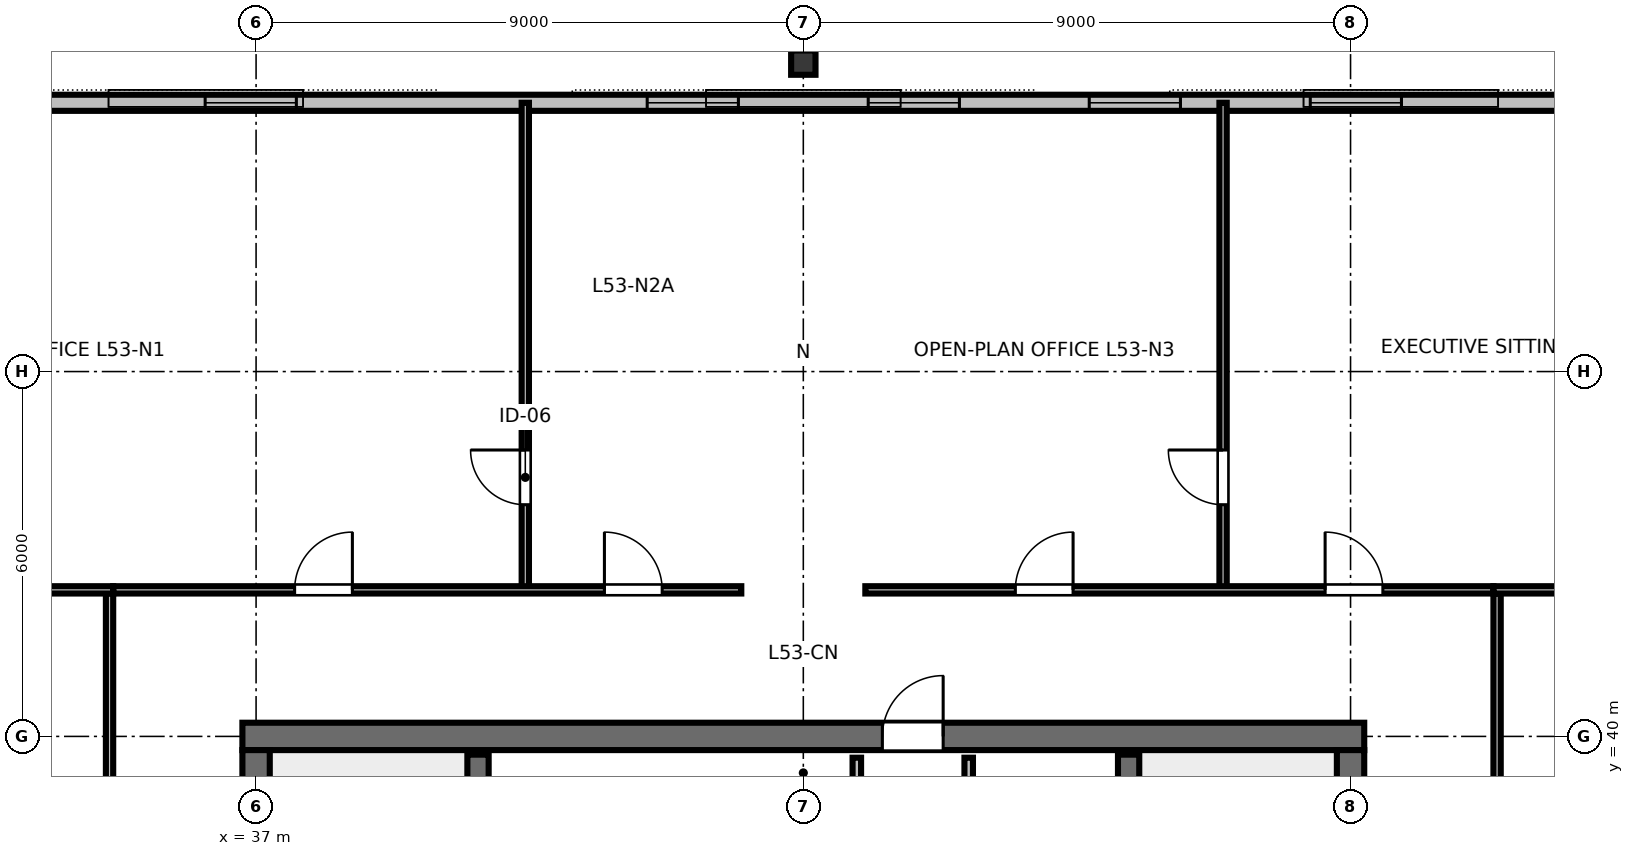
"""IFC4 building model, lengths in metres.
Left out: names, types, materials, properties, quantities, classifications, styles, units other than length and angle.
Written with IfcOpenShell. Run it as: python <this file> out.ifc"""

import sys

from ifc_helpers import new_model, si_unit, direction, frame, frame_2d, origin, origin_2d, place, context, subcontext, project, spatial, rectangle, i_section, extrude, element, fill, save


model = new_model("IFC4")
c1 = context("Model", 3, precision=1e-05, world=origin(), true_north=direction((0.0, 1.0)))
c2 = subcontext(c1, "Body", "Model", "MODEL_VIEW")
j1 = project(units=[si_unit("LENGTHUNIT", "METRE"), si_unit("PLANEANGLEUNIT", "RADIAN")], contexts=[c1])
p1 = place(None, origin())
s1 = spatial("IfcSite", under=j1, at=p1, CompositionType="ELEMENT")
p2 = place(p1, origin())
s2 = spatial("IfcBuilding", under=s1, at=p2, CompositionType="ELEMENT")
p3 = place(p2, frame((0.0, 0.0, 202.2)))
s3 = spatial("IfcBuildingStorey", under=s2, at=p3, CompositionType="ELEMENT", Elevation=202.2)
p4 = place(p3, frame((36.775, 40.0, 0.0), z_axis=(0.0, 0.0, 1.0), x_axis=(1.0, 0.0, 0.0)))
e1 = element("IfcWall", 1, at=p4, inside=s3, PredefinedType="SHEAR", context=c2, shape_type="SweptSolid", body=[
    extrude(rectangle(XDim=18.45, YDim=0.45, at=frame_2d((9.225, 0.0))), origin(), (0.0, 0.0, 1.0), 3.36),
])
p5 = place(p4, frame((10.525, 0.0, 0.0)))
e2 = element("IfcOpeningElement", 2, at=p5, cuts=e1, PredefinedType="OPENING", context=c2, shape_type="SweptSolid", body=[
    extrude(rectangle(XDim=1.0, YDim=2.15, at=frame_2d((0.5, 1.075))), frame((0.0, 0.235, 0.0), z_axis=(0.0, -1.0, 0.0), x_axis=(1.0, 0.0, 0.0)), (0.0, 0.0, 1.0), 0.47),
])
p6 = place(p3, frame((37.0, 24.225, 0.0), z_axis=(0.0, 0.0, 1.0), x_axis=(0.0, 1.0, 0.0)))
e3 = element("IfcWall", 3, at=p6, inside=s3, PredefinedType="SHEAR", context=c2, shape_type="SweptSolid", body=[
    extrude(rectangle(XDim=15.55, YDim=0.45, at=frame_2d((7.775, 0.0))), origin(), (0.0, 0.0, 1.0), 3.36),
])
p7 = place(p6, frame((5.3, 0.0, 0.0)))
e4 = element("IfcOpeningElement", 4, at=p7, cuts=e3, PredefinedType="OPENING", context=c2, shape_type="SweptSolid", body=[
    extrude(rectangle(XDim=1.15, YDim=2.15, at=frame_2d((0.575, 1.075))), frame((0.0, 0.235, 0.0), z_axis=(0.0, -1.0, 0.0), x_axis=(1.0, 0.0, 0.0)), (0.0, 0.0, 1.0), 0.47),
])
p8 = place(p3, frame((55.0, 24.225, 0.0), z_axis=(0.0, 0.0, 1.0), x_axis=(0.0, 1.0, 0.0)))
e5 = element("IfcWall", 5, at=p8, inside=s3, PredefinedType="SHEAR", context=c2, shape_type="SweptSolid", body=[
    extrude(rectangle(XDim=15.55, YDim=0.45, at=frame_2d((7.775, 0.0))), origin(), (0.0, 0.0, 1.0), 3.36),
])
p9 = place(p8, frame((5.3, 0.0, 0.0)))
e6 = element("IfcOpeningElement", 6, at=p9, cuts=e5, PredefinedType="OPENING", context=c2, shape_type="SweptSolid", body=[
    extrude(rectangle(XDim=1.15, YDim=2.15, at=frame_2d((0.575, 1.075))), frame((0.0, 0.235, 0.0), z_axis=(0.0, -1.0, 0.0), x_axis=(1.0, 0.0, 0.0)), (0.0, 0.0, 1.0), 0.47),
])
p10 = place(p3, frame((46.0, 51.08, 0.0), z_axis=(0.0, 0.0, 1.0), x_axis=(1.0, 0.0, 0.0)))
e7 = element("IfcColumn", 7, at=p10, inside=s3, PredefinedType="COLUMN", context=c2, shape_type="SweptSolid", body=[
    extrude(i_section(OverallWidth=0.401, OverallDepth=0.399, WebThickness=0.025, FlangeThickness=0.04, FilletRadius=0.025, at=origin_2d()), origin(), (0.0, 0.0, 1.0), 3.373),
])
p11 = place(p3, frame((61.64, 50.42, 0.0), z_axis=(0.0, 0.0, 1.0), x_axis=(-1.0, 0.0, 0.0)))
e8 = element("IfcWall", 8, at=p11, inside=s3, PredefinedType="STANDARD", context=c2, shape_type="SweptSolid", body=[
    extrude(rectangle(XDim=31.28, YDim=0.265, at=frame_2d((15.64, 0.0))), origin(), (0.0, 0.0, 1.0), 3.375),
])
p12 = place(p11, frame((5.802, 0.0, 0.85)))
e9 = element("IfcOpeningElement", 9, at=p12, cuts=e8, PredefinedType="OPENING", context=c2, shape_type="SweptSolid", body=[
    extrude(rectangle(XDim=1.5, YDim=1.85, at=frame_2d((0.75, 0.925))), frame((0.0, 0.142, 0.0), z_axis=(0.0, -1.0, 0.0), x_axis=(1.0, 0.0, 0.0)), (0.0, 0.0, 1.0), 0.285),
])
p13 = place(p11, frame((9.438, 0.0, 0.85)))
e10 = element("IfcOpeningElement", 10, at=p13, cuts=e8, PredefinedType="OPENING", context=c2, shape_type="SweptSolid", body=[
    extrude(rectangle(XDim=1.5, YDim=1.85, at=frame_2d((0.75, 0.925))), frame((0.0, 0.142, 0.0), z_axis=(0.0, -1.0, 0.0), x_axis=(1.0, 0.0, 0.0)), (0.0, 0.0, 1.0), 0.285),
])
p14 = place(p11, frame((13.073, 0.0, 0.85)))
e11 = element("IfcOpeningElement", 11, at=p14, cuts=e8, PredefinedType="OPENING", context=c2, shape_type="SweptSolid", body=[
    extrude(rectangle(XDim=1.5, YDim=1.85, at=frame_2d((0.75, 0.925))), frame((0.0, 0.142, 0.0), z_axis=(0.0, -1.0, 0.0), x_axis=(1.0, 0.0, 0.0)), (0.0, 0.0, 1.0), 0.285),
])
p15 = place(p11, frame((16.708, 0.0, 0.85)))
e12 = element("IfcOpeningElement", 12, at=p15, cuts=e8, PredefinedType="OPENING", context=c2, shape_type="SweptSolid", body=[
    extrude(rectangle(XDim=1.5, YDim=1.85, at=frame_2d((0.75, 0.925))), frame((0.0, 0.142, 0.0), z_axis=(0.0, -1.0, 0.0), x_axis=(1.0, 0.0, 0.0)), (0.0, 0.0, 1.0), 0.285),
])
p16 = place(p11, frame((23.978, 0.0, 0.85)))
e13 = element("IfcOpeningElement", 13, at=p16, cuts=e8, PredefinedType="OPENING", context=c2, shape_type="SweptSolid", body=[
    extrude(rectangle(XDim=1.5, YDim=1.85, at=frame_2d((0.75, 0.925))), frame((0.0, 0.142, 0.0), z_axis=(0.0, -1.0, 0.0), x_axis=(1.0, 0.0, 0.0)), (0.0, 0.0, 1.0), 0.285),
])
for number, where, z_axis, x_axis in (
    (14, (40.65, 32.0, 0.0), (0.0, 0.0, 1.0), (0.0, 1.0, 0.0)),
    (15, (51.35, 32.0, 0.0), (0.0, 0.0, 1.0), (0.0, 1.0, 0.0)),
):
    element("IfcWall", number, at=place(p3, frame(where, z_axis=z_axis, x_axis=x_axis)), inside=s3, PredefinedType="SHEAR", context=c2, shape_type="SweptSolid", body=[
        extrude(rectangle(XDim=7.7, YDim=0.35, at=frame_2d((3.85, 0.0))), origin(), (0.0, 0.0, 1.0), 3.6),
    ])
p17 = place(p3, frame((46.88, 32.05, 0.0), z_axis=(0.0, 0.0, 1.0), x_axis=(0.0, 1.0, 0.0)))
e16 = element("IfcWall", 16, at=p17, inside=s3, PredefinedType="PARTITIONING", context=c2, shape_type="SweptSolid", body=[
    extrude(rectangle(XDim=7.6, YDim=0.14, at=frame_2d((3.8, 0.0))), origin(), (0.0, 0.0, 1.0), 3.375),
])
p18 = place(p17, frame((3.4, 0.0, 0.0)))
e17 = element("IfcOpeningElement", 17, at=p18, cuts=e16, PredefinedType="OPENING", context=c2, shape_type="SweptSolid", body=[
    extrude(rectangle(XDim=0.95, YDim=2.15, at=frame_2d((0.475, 1.075))), frame((0.0, 0.08, 0.0), z_axis=(0.0, -1.0, 0.0), x_axis=(1.0, 0.0, 0.0)), (0.0, 0.0, 1.0), 0.16),
])
p19 = place(p3, frame((48.72, 32.05, 0.0), z_axis=(0.0, 0.0, 1.0), x_axis=(0.0, 1.0, 0.0)))
e18 = element("IfcWall", 18, at=p19, inside=s3, PredefinedType="PARTITIONING", context=c2, shape_type="SweptSolid", body=[
    extrude(rectangle(XDim=7.6, YDim=0.14, at=frame_2d((3.8, 0.0))), origin(), (0.0, 0.0, 1.0), 3.375),
])
p20 = place(p19, frame((0.8, 0.0, 0.0)))
e19 = element("IfcOpeningElement", 19, at=p20, cuts=e18, PredefinedType="OPENING", context=c2, shape_type="SweptSolid", body=[
    extrude(rectangle(XDim=0.9, YDim=2.15, at=frame_2d((0.45, 1.075))), frame((0.0, 0.08, 0.0), z_axis=(0.0, -1.0, 0.0), x_axis=(1.0, 0.0, 0.0)), (0.0, 0.0, 1.0), 0.16),
])
p21 = place(p19, frame((3.35, 0.0, 0.0)))
e20 = element("IfcOpeningElement", 20, at=p21, cuts=e18, PredefinedType="OPENING", context=c2, shape_type="SweptSolid", body=[
    extrude(rectangle(XDim=0.9, YDim=2.15, at=frame_2d((0.45, 1.075))), frame((0.0, 0.08, 0.0), z_axis=(0.0, -1.0, 0.0), x_axis=(1.0, 0.0, 0.0)), (0.0, 0.0, 1.0), 0.16),
])
p22 = place(p19, frame((5.9, 0.0, 0.0)))
e21 = element("IfcOpeningElement", 21, at=p22, cuts=e18, PredefinedType="OPENING", context=c2, shape_type="SweptSolid", body=[
    extrude(rectangle(XDim=0.92, YDim=2.15, at=frame_2d((0.46, 1.075))), frame((0.0, 0.08, 0.0), z_axis=(0.0, -1.0, 0.0), x_axis=(1.0, 0.0, 0.0)), (0.0, 0.0, 1.0), 0.16),
])
p23 = place(p3, frame((41.428, 42.41, 0.0), z_axis=(0.0, 0.0, 1.0), x_axis=(0.0, 1.0, 0.0)))
e22 = element("IfcWall", 22, at=p23, inside=s3, PredefinedType="PARTITIONING", context=c2, shape_type="SweptSolid", body=[
    extrude(rectangle(XDim=8.01, YDim=0.12, at=frame_2d((4.005, 0.0))), origin(), (0.0, 0.0, 1.0), 2.655),
])
p24 = place(p23, frame((1.4, 0.0, 0.0)))
e23 = element("IfcOpeningElement", 23, at=p24, cuts=e22, PredefinedType="OPENING", context=c2, shape_type="SweptSolid", body=[
    extrude(rectangle(XDim=0.9, YDim=2.15, at=frame_2d((0.45, 1.075))), frame((0.0, 0.07, 0.0), z_axis=(0.0, -1.0, 0.0), x_axis=(1.0, 0.0, 0.0)), (0.0, 0.0, 1.0), 0.14),
])
p25 = place(p3, frame((52.903, 42.41, 0.0), z_axis=(0.0, 0.0, 1.0), x_axis=(0.0, 1.0, 0.0)))
e24 = element("IfcWall", 24, at=p25, inside=s3, PredefinedType="PARTITIONING", context=c2, shape_type="SweptSolid", body=[
    extrude(rectangle(XDim=8.01, YDim=0.12, at=frame_2d((4.005, 0.0))), origin(), (0.0, 0.0, 1.0), 2.655),
])
p26 = place(p25, frame((1.4, 0.0, 0.0)))
e25 = element("IfcOpeningElement", 25, at=p26, cuts=e24, PredefinedType="OPENING", context=c2, shape_type="SweptSolid", body=[
    extrude(rectangle(XDim=0.9, YDim=2.15, at=frame_2d((0.45, 1.075))), frame((0.0, 0.07, 0.0), z_axis=(0.0, -1.0, 0.0), x_axis=(1.0, 0.0, 0.0)), (0.0, 0.0, 1.0), 0.14),
])
p27 = place(p3, frame((34.65, 42.41, 0.0), z_axis=(0.0, 0.0, 1.0), x_axis=(1.0, 0.0, 0.0)))
e26 = element("IfcWall", 26, at=p27, inside=s3, PredefinedType="PARTITIONING", context=c2, shape_type="SweptSolid", body=[
    extrude(rectangle(XDim=10.33, YDim=0.12, at=frame_2d((5.165, 0.0))), origin(), (0.0, 0.0, 1.0), 2.655),
])
p28 = place(p27, frame((2.984, 0.0, 0.0)))
e27 = element("IfcOpeningElement", 27, at=p28, cuts=e26, PredefinedType="OPENING", context=c2, shape_type="SweptSolid", body=[
    extrude(rectangle(XDim=0.95, YDim=2.15, at=frame_2d((0.475, 1.075))), frame((0.0, 0.07, 0.0), z_axis=(0.0, -1.0, 0.0), x_axis=(1.0, 0.0, 0.0)), (0.0, 0.0, 1.0), 0.14),
])
p29 = place(p27, frame((8.079, 0.0, 0.0)))
e28 = element("IfcOpeningElement", 28, at=p29, cuts=e26, PredefinedType="OPENING", context=c2, shape_type="SweptSolid", body=[
    extrude(rectangle(XDim=0.95, YDim=2.15, at=frame_2d((0.475, 1.075))), frame((0.0, 0.07, 0.0), z_axis=(0.0, -1.0, 0.0), x_axis=(1.0, 0.0, 0.0)), (0.0, 0.0, 1.0), 0.14),
])
p30 = place(p3, frame((47.02, 42.41, 0.0), z_axis=(0.0, 0.0, 1.0), x_axis=(1.0, 0.0, 0.0)))
e29 = element("IfcWall", 29, at=p30, inside=s3, PredefinedType="PARTITIONING", context=c2, shape_type="SweptSolid", body=[
    extrude(rectangle(XDim=10.33, YDim=0.12, at=frame_2d((5.165, 0.0))), origin(), (0.0, 0.0, 1.0), 2.655),
])
p31 = place(p30, frame((2.467, 0.0, 0.0)))
e30 = element("IfcOpeningElement", 30, at=p31, cuts=e29, PredefinedType="OPENING", context=c2, shape_type="SweptSolid", body=[
    extrude(rectangle(XDim=0.95, YDim=2.15, at=frame_2d((0.475, 1.075))), frame((0.0, 0.07, 0.0), z_axis=(0.0, -1.0, 0.0), x_axis=(1.0, 0.0, 0.0)), (0.0, 0.0, 1.0), 0.14),
])
p32 = place(p30, frame((7.562, 0.0, 0.0)))
e31 = element("IfcOpeningElement", 31, at=p32, cuts=e29, PredefinedType="OPENING", context=c2, shape_type="SweptSolid", body=[
    extrude(rectangle(XDim=0.95, YDim=2.15, at=frame_2d((0.475, 1.075))), frame((0.0, 0.07, 0.0), z_axis=(0.0, -1.0, 0.0), x_axis=(1.0, 0.0, 0.0)), (0.0, 0.0, 1.0), 0.14),
])
p33 = place(p3, frame((34.59, 21.65, 0.0), z_axis=(0.0, 0.0, 1.0), x_axis=(0.0, 1.0, 0.0)))
e32 = element("IfcWall", 32, at=p33, inside=s3, PredefinedType="PARTITIONING", context=c2, shape_type="SweptSolid", body=[
    extrude(rectangle(XDim=20.7, YDim=0.12, at=frame_2d((10.35, 0.0))), origin(), (0.0, 0.0, 1.0), 2.655),
])
p34 = place(p33, frame((2.698, 0.0, 0.0)))
e33 = element("IfcOpeningElement", 33, at=p34, cuts=e32, PredefinedType="OPENING", context=c2, shape_type="SweptSolid", body=[
    extrude(rectangle(XDim=0.95, YDim=2.15, at=frame_2d((0.475, 1.075))), frame((0.0, 0.07, 0.0), z_axis=(0.0, -1.0, 0.0), x_axis=(1.0, 0.0, 0.0)), (0.0, 0.0, 1.0), 0.14),
])
p35 = place(p33, frame((8.556, 0.0, 0.0)))
e34 = element("IfcOpeningElement", 34, at=p35, cuts=e32, PredefinedType="OPENING", context=c2, shape_type="SweptSolid", body=[
    extrude(rectangle(XDim=0.95, YDim=2.15, at=frame_2d((0.475, 1.075))), frame((0.0, 0.07, 0.0), z_axis=(0.0, -1.0, 0.0), x_axis=(1.0, 0.0, 0.0)), (0.0, 0.0, 1.0), 0.14),
])
p36 = place(p33, frame((15.733, 0.0, 0.0)))
e35 = element("IfcOpeningElement", 35, at=p36, cuts=e32, PredefinedType="OPENING", context=c2, shape_type="SweptSolid", body=[
    extrude(rectangle(XDim=0.95, YDim=2.15, at=frame_2d((0.475, 1.075))), frame((0.0, 0.07, 0.0), z_axis=(0.0, -1.0, 0.0), x_axis=(1.0, 0.0, 0.0)), (0.0, 0.0, 1.0), 0.14),
])
p37 = place(p3, frame((57.41, 21.65, 0.0), z_axis=(0.0, 0.0, 1.0), x_axis=(0.0, 1.0, 0.0)))
e36 = element("IfcWall", 36, at=p37, inside=s3, PredefinedType="PARTITIONING", context=c2, shape_type="SweptSolid", body=[
    extrude(rectangle(XDim=20.7, YDim=0.12, at=frame_2d((10.35, 0.0))), origin(), (0.0, 0.0, 1.0), 2.655),
])
p38 = place(p37, frame((5.525, 0.0, 0.0)))
e37 = element("IfcOpeningElement", 37, at=p38, cuts=e36, PredefinedType="OPENING", context=c2, shape_type="SweptSolid", body=[
    extrude(rectangle(XDim=0.95, YDim=2.15, at=frame_2d((0.475, 1.075))), frame((0.0, 0.07, 0.0), z_axis=(0.0, -1.0, 0.0), x_axis=(1.0, 0.0, 0.0)), (0.0, 0.0, 1.0), 0.14),
])
p39 = place(p37, frame((15.675, 0.0, 0.0)))
e38 = element("IfcOpeningElement", 38, at=p39, cuts=e36, PredefinedType="OPENING", context=c2, shape_type="SweptSolid", body=[
    extrude(rectangle(XDim=0.95, YDim=2.15, at=frame_2d((0.475, 1.075))), frame((0.0, 0.07, 0.0), z_axis=(0.0, -1.0, 0.0), x_axis=(1.0, 0.0, 0.0)), (0.0, 0.0, 1.0), 0.14),
])
for number, where, z_axis, x_axis in (
    (39, (34.65, 42.41, 0.0), (0.0, 0.0, 1.0), (-1.0, 0.0, 0.0)),
    (40, (57.35, 42.41, 0.0), (0.0, 0.0, 1.0), (1.0, 0.0, 0.0)),
):
    element("IfcWall", number, at=place(p3, frame(where, z_axis=z_axis, x_axis=x_axis)), inside=s3, PredefinedType="PARTITIONING", context=c2, shape_type="SweptSolid", body=[
        extrude(rectangle(XDim=9.47, YDim=0.12, at=frame_2d((4.735, 0.0))), origin(), (0.0, 0.0, 1.0), 2.655),
    ])
p40 = place(p12, origin())
e41 = element("IfcWindow", 41, at=p40, inside=s3, PartitioningType="SINGLE_PANEL", PredefinedType="WINDOW", context=c2, shape_type="SweptSolid", body=[
    extrude(rectangle(XDim=1.5, YDim=1.85, at=frame_2d((0.75, 0.925))), frame((0.0, 0.03, 0.0), z_axis=(0.0, -1.0, 0.0), x_axis=(1.0, 0.0, 0.0)), (0.0, 0.0, 1.0), 0.06),
])
fill(e9, e41)
p41 = place(p13, origin())
e42 = element("IfcWindow", 42, at=p41, inside=s3, PartitioningType="SINGLE_PANEL", PredefinedType="WINDOW", context=c2, shape_type="SweptSolid", body=[
    extrude(rectangle(XDim=1.5, YDim=1.85, at=frame_2d((0.75, 0.925))), frame((0.0, 0.03, 0.0), z_axis=(0.0, -1.0, 0.0), x_axis=(1.0, 0.0, 0.0)), (0.0, 0.0, 1.0), 0.06),
])
fill(e10, e42)
p42 = place(p14, origin())
e43 = element("IfcWindow", 43, at=p42, inside=s3, PartitioningType="SINGLE_PANEL", PredefinedType="WINDOW", context=c2, shape_type="SweptSolid", body=[
    extrude(rectangle(XDim=1.5, YDim=1.85, at=frame_2d((0.75, 0.925))), frame((0.0, 0.03, 0.0), z_axis=(0.0, -1.0, 0.0), x_axis=(1.0, 0.0, 0.0)), (0.0, 0.0, 1.0), 0.06),
])
fill(e11, e43)
p43 = place(p15, origin())
e44 = element("IfcWindow", 44, at=p43, inside=s3, PartitioningType="SINGLE_PANEL", PredefinedType="WINDOW", context=c2, shape_type="SweptSolid", body=[
    extrude(rectangle(XDim=1.5, YDim=1.85, at=frame_2d((0.75, 0.925))), frame((0.0, 0.03, 0.0), z_axis=(0.0, -1.0, 0.0), x_axis=(1.0, 0.0, 0.0)), (0.0, 0.0, 1.0), 0.06),
])
fill(e12, e44)
p44 = place(p16, origin())
e45 = element("IfcWindow", 45, at=p44, inside=s3, PartitioningType="SINGLE_PANEL", PredefinedType="WINDOW", context=c2, shape_type="SweptSolid", body=[
    extrude(rectangle(XDim=1.5, YDim=1.85, at=frame_2d((0.75, 0.925))), frame((0.0, 0.03, 0.0), z_axis=(0.0, -1.0, 0.0), x_axis=(1.0, 0.0, 0.0)), (0.0, 0.0, 1.0), 0.06),
])
fill(e13, e45)
p45 = place(p5, origin())
e46 = element("IfcDoor", 46, at=p45, inside=s3, OperationType="SINGLE_SWING_RIGHT", PredefinedType="DOOR", context=c2, shape_type="SweptSolid", body=[
    extrude(rectangle(XDim=1.0, YDim=2.15, at=frame_2d((0.5, 1.075))), frame((0.0, 0.025, 0.0), z_axis=(0.0, -1.0, 0.0), x_axis=(1.0, 0.0, 0.0)), (0.0, 0.0, 1.0), 0.05),
])
fill(e2, e46)
p46 = place(p24, origin())
e47 = element("IfcDoor", 47, at=p46, inside=s3, OperationType="SINGLE_SWING_RIGHT", PredefinedType="DOOR", context=c2, shape_type="SweptSolid", body=[
    extrude(rectangle(XDim=0.9, YDim=2.15, at=frame_2d((0.45, 1.075))), frame((0.0, 0.025, 0.0), z_axis=(0.0, -1.0, 0.0), x_axis=(1.0, 0.0, 0.0)), (0.0, 0.0, 1.0), 0.05),
])
fill(e23, e47)
p47 = place(p26, origin())
e48 = element("IfcDoor", 48, at=p47, inside=s3, OperationType="SINGLE_SWING_RIGHT", PredefinedType="DOOR", context=c2, shape_type="SweptSolid", body=[
    extrude(rectangle(XDim=0.9, YDim=2.15, at=frame_2d((0.45, 1.075))), frame((0.0, 0.025, 0.0), z_axis=(0.0, -1.0, 0.0), x_axis=(1.0, 0.0, 0.0)), (0.0, 0.0, 1.0), 0.05),
])
fill(e25, e48)
p48 = place(p28, origin())
e49 = element("IfcDoor", 49, at=p48, inside=s3, OperationType="SINGLE_SWING_RIGHT", PredefinedType="DOOR", context=c2, shape_type="SweptSolid", body=[
    extrude(rectangle(XDim=0.95, YDim=2.15, at=frame_2d((0.475, 1.075))), frame((0.0, 0.025, 0.0), z_axis=(0.0, -1.0, 0.0), x_axis=(1.0, 0.0, 0.0)), (0.0, 0.0, 1.0), 0.05),
])
fill(e27, e49)
p49 = place(p29, origin())
e50 = element("IfcDoor", 50, at=p49, inside=s3, OperationType="SINGLE_SWING_LEFT", PredefinedType="DOOR", context=c2, shape_type="SweptSolid", body=[
    extrude(rectangle(XDim=0.95, YDim=2.15, at=frame_2d((0.475, 1.075))), frame((0.0, 0.025, 0.0), z_axis=(0.0, -1.0, 0.0), x_axis=(1.0, 0.0, 0.0)), (0.0, 0.0, 1.0), 0.05),
])
fill(e28, e50)
p50 = place(p31, origin())
e51 = element("IfcDoor", 51, at=p50, inside=s3, OperationType="SINGLE_SWING_RIGHT", PredefinedType="DOOR", context=c2, shape_type="SweptSolid", body=[
    extrude(rectangle(XDim=0.95, YDim=2.15, at=frame_2d((0.475, 1.075))), frame((0.0, 0.025, 0.0), z_axis=(0.0, -1.0, 0.0), x_axis=(1.0, 0.0, 0.0)), (0.0, 0.0, 1.0), 0.05),
])
fill(e30, e51)
p51 = place(p32, origin())
e52 = element("IfcDoor", 52, at=p51, inside=s3, OperationType="SINGLE_SWING_LEFT", PredefinedType="DOOR", context=c2, shape_type="SweptSolid", body=[
    extrude(rectangle(XDim=0.95, YDim=2.15, at=frame_2d((0.475, 1.075))), frame((0.0, 0.025, 0.0), z_axis=(0.0, -1.0, 0.0), x_axis=(1.0, 0.0, 0.0)), (0.0, 0.0, 1.0), 0.05),
])
fill(e31, e52)
save(model, sys.argv[1])
